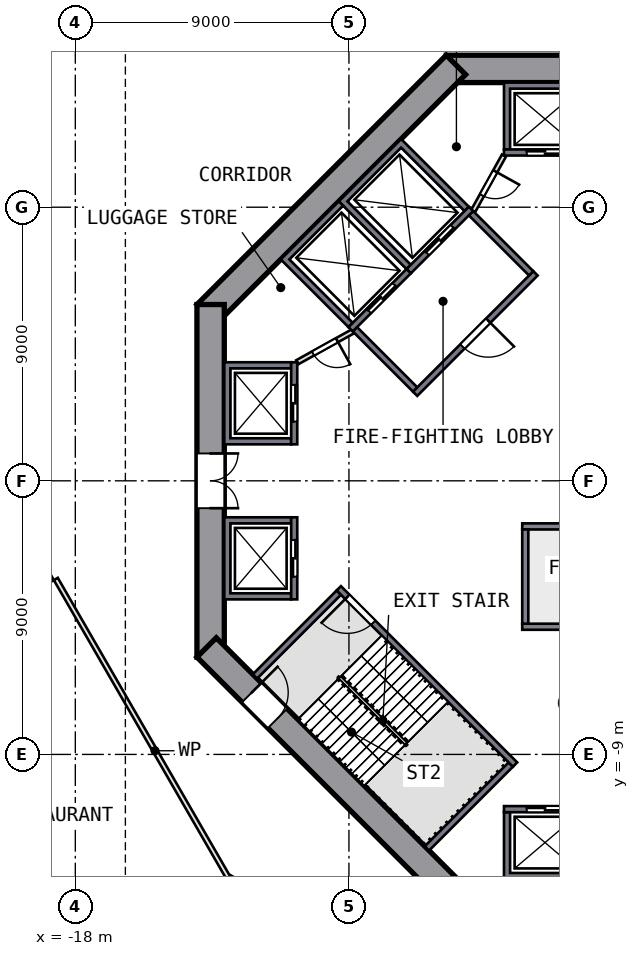
"""IFC4 building model, lengths in metres.
Left out: names, types, materials, properties, quantities, classifications, styles, units other than length and angle.
Written with IfcOpenShell. Run it as: python <this file> out.ifc"""

import sys

from ifc_helpers import new_model, si_unit, direction, frame, frame_2d, origin, place, context, subcontext, project, spatial, polyline, rectangle, outline, extrude, element, fill, save


model = new_model("IFC4")
c1 = context("Model", 3, precision=1e-05, world=origin(), true_north=direction((0.0, 1.0)))
c2 = subcontext(c1, "Body", "Model", "MODEL_VIEW")
j1 = project(units=[si_unit("LENGTHUNIT", "METRE"), si_unit("PLANEANGLEUNIT", "RADIAN")], contexts=[c1])
p1 = place(None, origin())
s1 = spatial("IfcSite", under=j1, at=p1, CompositionType="ELEMENT")
p2 = place(p1, origin())
s2 = spatial("IfcBuilding", under=s1, at=p2, CompositionType="ELEMENT")
p3 = place(p2, origin())
s3 = spatial("IfcBuildingStorey", under=s2, at=p3, CompositionType="ELEMENT", Elevation=0.0)
p4 = place(p3, frame((5.799, 13.55, 0.0), z_axis=(0.0, 0.0, 1.0), x_axis=(-1.0, 0.0, 0.0)))
e1 = element("IfcWall", 1, at=p4, inside=s3, PredefinedType="SHEAR", context=c2, shape_type="SweptSolid", body=[
    extrude(rectangle(XDim=11.598, YDim=0.9, at=frame_2d((5.799, 0.0))), origin(), (0.0, 0.0, 1.0), 8.0),
])
p5 = place(p4, frame((4.899, 0.0, 0.0)))
e2 = element("IfcOpeningElement", 2, at=p5, cuts=e1, PredefinedType="OPENING", context=c2, shape_type="SweptSolid", body=[
    extrude(rectangle(XDim=1.8, YDim=2.1, at=frame_2d((0.9, 1.05))), frame((0.0, 0.46, 0.0), z_axis=(0.0, -1.0, 0.0), x_axis=(1.0, 0.0, 0.0)), (0.0, 0.0, 1.0), 0.92),
])
p6 = place(p3, frame((-5.481, 13.682, 0.0), z_axis=(0.0, 0.0, 1.0), x_axis=(-0.707106781, -0.707106781, 0.0)))
e3 = element("IfcWall", 3, at=p6, inside=s3, PredefinedType="SHEAR", context=c2, shape_type="SweptSolid", body=[
    extrude(rectangle(XDim=11.598, YDim=0.9, at=frame_2d((5.799, 0.0))), origin(), (0.0, 0.0, 1.0), 8.0),
])
p7 = place(p3, frame((-13.55, 5.799, 0.0), z_axis=(0.0, 0.0, 1.0), x_axis=(0.0, -1.0, 0.0)))
e4 = element("IfcWall", 4, at=p7, inside=s3, PredefinedType="SHEAR", context=c2, shape_type="SweptSolid", body=[
    extrude(rectangle(XDim=11.598, YDim=0.9, at=frame_2d((5.799, 0.0))), origin(), (0.0, 0.0, 1.0), 8.0),
])
p8 = place(p7, frame((4.899, 0.0, 0.0)))
e5 = element("IfcOpeningElement", 5, at=p8, cuts=e4, PredefinedType="OPENING", context=c2, shape_type="SweptSolid", body=[
    extrude(rectangle(XDim=1.8, YDim=2.1, at=frame_2d((0.9, 1.05))), frame((0.0, 0.46, 0.0), z_axis=(0.0, -1.0, 0.0), x_axis=(1.0, 0.0, 0.0)), (0.0, 0.0, 1.0), 0.92),
])
p9 = place(p3, frame((-13.682, -5.481, 0.0), z_axis=(0.0, 0.0, 1.0), x_axis=(0.707106781, -0.707106781, 0.0)))
e6 = element("IfcWall", 6, at=p9, inside=s3, PredefinedType="SHEAR", context=c2, shape_type="SweptSolid", body=[
    extrude(rectangle(XDim=11.598, YDim=0.9, at=frame_2d((5.799, 0.0))), origin(), (0.0, 0.0, 1.0), 8.0),
])
p10 = place(p9, frame((2.099, 0.0, 0.0)))
e7 = element("IfcOpeningElement", 7, at=p10, cuts=e6, PredefinedType="OPENING", context=c2, shape_type="SweptSolid", body=[
    extrude(rectangle(XDim=1.2, YDim=2.1, at=frame_2d((0.6, 1.05))), frame((0.0, 0.46, 0.0), z_axis=(0.0, -1.0, 0.0), x_axis=(1.0, 0.0, 0.0)), (0.0, 0.0, 1.0), 0.92),
])
p11 = place(p3, origin())
e8 = element("IfcWall", 8, at=p11, inside=s3, PredefinedType="SOLIDWALL", context=c2, shape_type="SweptSolid", body=[
    extrude(outline(polyline([(-3.9, 10.9), (-3.9, 13.1), (-1.2, 13.1), (-1.2, 10.9), (-1.4, 10.9), (-1.4, 12.9), (-3.7, 12.9), (-3.7, 10.9), (-3.9, 10.9)])), origin(), (0.0, 0.0, 1.0), 7.55),
])
p12 = place(p3, frame((-1.2, 10.8, 0.0), z_axis=(0.0, 0.0, 1.0), x_axis=(-1.0, 0.0, 0.0)))
e9 = element("IfcWall", 9, at=p12, inside=s3, PredefinedType="SOLIDWALL", context=c2, shape_type="SweptSolid", body=[
    extrude(rectangle(XDim=2.7, YDim=0.2, at=frame_2d((1.35, 0.0))), origin(), (0.0, 0.0, 1.0), 7.55),
])
p13 = place(p12, frame((0.75, 0.0, 0.0)))
e10 = element("IfcOpeningElement", 10, at=p13, cuts=e9, PredefinedType="OPENING", context=c2, shape_type="SweptSolid", body=[
    extrude(rectangle(XDim=1.2, YDim=2.1, at=frame_2d((0.6, 1.05))), frame((0.0, 0.11, 0.0), z_axis=(0.0, -1.0, 0.0), x_axis=(1.0, 0.0, 0.0)), (0.0, 0.0, 1.0), 0.22),
])
p14 = place(p3, origin())
e11 = element("IfcWall", 11, at=p14, inside=s3, PredefinedType="SOLIDWALL", context=c2, shape_type="SweptSolid", body=[
    extrude(outline(polyline([(-13.1, 3.9), (-10.9, 3.9), (-10.9, 3.7), (-12.9, 3.7), (-12.9, 1.4), (-10.9, 1.4), (-10.9, 1.2), (-13.1, 1.2), (-13.1, 3.9)])), origin(), (0.0, 0.0, 1.0), 7.55),
])
p15 = place(p3, frame((-10.8, 1.2, 0.0), z_axis=(0.0, 0.0, 1.0), x_axis=(0.0, 1.0, 0.0)))
e12 = element("IfcWall", 12, at=p15, inside=s3, PredefinedType="SOLIDWALL", context=c2, shape_type="SweptSolid", body=[
    extrude(rectangle(XDim=2.7, YDim=0.2, at=frame_2d((1.35, 0.0))), origin(), (0.0, 0.0, 1.0), 7.55),
])
p16 = place(p15, frame((0.75, 0.0, 0.0)))
e13 = element("IfcOpeningElement", 13, at=p16, cuts=e12, PredefinedType="OPENING", context=c2, shape_type="SweptSolid", body=[
    extrude(rectangle(XDim=1.2, YDim=2.1, at=frame_2d((0.6, 1.05))), frame((0.0, 0.11, 0.0), z_axis=(0.0, -1.0, 0.0), x_axis=(1.0, 0.0, 0.0)), (0.0, 0.0, 1.0), 0.22),
])
p17 = place(p3, origin())
e14 = element("IfcWall", 14, at=p17, inside=s3, PredefinedType="SOLIDWALL", context=c2, shape_type="SweptSolid", body=[
    extrude(outline(polyline([(-13.1, -3.9), (-13.1, -1.2), (-10.9, -1.2), (-10.9, -1.4), (-12.9, -1.4), (-12.9, -3.7), (-10.9, -3.7), (-10.9, -3.9), (-13.1, -3.9)])), origin(), (0.0, 0.0, 1.0), 7.55),
])
p18 = place(p3, frame((-10.8, -1.2, 0.0), z_axis=(0.0, 0.0, 1.0), x_axis=(0.0, -1.0, 0.0)))
e15 = element("IfcWall", 15, at=p18, inside=s3, PredefinedType="SOLIDWALL", context=c2, shape_type="SweptSolid", body=[
    extrude(rectangle(XDim=2.7, YDim=0.2, at=frame_2d((1.35, 0.0))), origin(), (0.0, 0.0, 1.0), 7.55),
])
p19 = place(p18, frame((0.75, 0.0, 0.0)))
e16 = element("IfcOpeningElement", 16, at=p19, cuts=e15, PredefinedType="OPENING", context=c2, shape_type="SweptSolid", body=[
    extrude(rectangle(XDim=1.2, YDim=2.1, at=frame_2d((0.6, 1.05))), frame((0.0, 0.11, 0.0), z_axis=(0.0, -1.0, 0.0), x_axis=(1.0, 0.0, 0.0)), (0.0, 0.0, 1.0), 0.22),
])
p20 = place(p3, origin())
e17 = element("IfcWall", 17, at=p20, inside=s3, PredefinedType="SOLIDWALL", context=c2, shape_type="SweptSolid", body=[
    extrude(outline(polyline([(-3.9, -13.1), (-3.9, -10.9), (-3.7, -10.9), (-3.7, -12.9), (-1.4, -12.9), (-1.4, -10.9), (-1.2, -10.9), (-1.2, -13.1), (-3.9, -13.1)])), origin(), (0.0, 0.0, 1.0), 7.55),
])
p21 = place(p3, frame((-1.2, -10.8, 0.0), z_axis=(0.0, 0.0, 1.0), x_axis=(-1.0, 0.0, 0.0)))
e18 = element("IfcWall", 18, at=p21, inside=s3, PredefinedType="SOLIDWALL", context=c2, shape_type="SweptSolid", body=[
    extrude(rectangle(XDim=2.7, YDim=0.2, at=frame_2d((1.35, 0.0))), origin(), (0.0, 0.0, 1.0), 7.55),
])
p22 = place(p21, frame((0.75, 0.0, 0.0)))
e19 = element("IfcOpeningElement", 19, at=p22, cuts=e18, PredefinedType="OPENING", context=c2, shape_type="SweptSolid", body=[
    extrude(rectangle(XDim=1.2, YDim=2.1, at=frame_2d((0.6, 1.05))), frame((0.0, 0.11, 0.0), z_axis=(0.0, -1.0, 0.0), x_axis=(1.0, 0.0, 0.0)), (0.0, 0.0, 1.0), 0.22),
])
p23 = place(p3, origin())
e20 = element("IfcWall", 20, at=p23, inside=s3, PredefinedType="SOLIDWALL", context=c2, shape_type="SweptSolid", body=[
    extrude(outline(polyline([(-9.334, 9.192), (-7.283, 11.243), (-5.056, 9.016), (-5.197, 8.874), (-7.283, 10.96), (-9.051, 9.192), (-6.965, 7.106), (-7.106, 6.965), (-9.334, 9.192)])), origin(), (0.0, 0.0, 1.0), 7.55),
])
p24 = place(p3, frame((-4.985, 8.945, 0.0), z_axis=(0.0, 0.0, 1.0), x_axis=(-0.707106781, -0.707106781, 0.0)))
e21 = element("IfcWall", 21, at=p24, inside=s3, PredefinedType="SOLIDWALL", context=c2, shape_type="SweptSolid", body=[
    extrude(rectangle(XDim=2.9, YDim=0.2, at=frame_2d((1.45, 0.0))), origin(), (0.0, 0.0, 1.0), 7.55),
])
p25 = place(p24, frame((0.85, 0.0, 0.0)))
e22 = element("IfcOpeningElement", 22, at=p25, cuts=e21, PredefinedType="OPENING", context=c2, shape_type="SweptSolid", body=[
    extrude(rectangle(XDim=1.2, YDim=2.1, at=frame_2d((0.6, 1.05))), frame((0.0, 0.11, 0.0), z_axis=(0.0, -1.0, 0.0), x_axis=(1.0, 0.0, 0.0)), (0.0, 0.0, 1.0), 0.22),
])
p26 = place(p3, origin())
e23 = element("IfcWall", 23, at=p26, inside=s3, PredefinedType="SOLIDWALL", context=c2, shape_type="SweptSolid", body=[
    extrude(outline(polyline([(-11.243, 7.283), (-9.334, 9.192), (-9.192, 9.051), (-10.96, 7.283), (-8.874, 5.197), (-9.016, 5.056), (-11.243, 7.283)])), origin(), (0.0, 0.0, 1.0), 7.55),
])
p27 = place(p3, frame((-7.036, 6.894, 0.0), z_axis=(0.0, 0.0, 1.0), x_axis=(-0.707106781, -0.707106781, 0.0)))
e24 = element("IfcWall", 24, at=p27, inside=s3, PredefinedType="SOLIDWALL", context=c2, shape_type="SweptSolid", body=[
    extrude(rectangle(XDim=2.7, YDim=0.2, at=frame_2d((1.35, 0.0))), origin(), (0.0, 0.0, 1.0), 7.55),
])
p28 = place(p27, frame((0.65, 0.0, 0.0)))
e25 = element("IfcOpeningElement", 25, at=p28, cuts=e24, PredefinedType="OPENING", context=c2, shape_type="SweptSolid", body=[
    extrude(rectangle(XDim=1.2, YDim=2.1, at=frame_2d((0.6, 1.05))), frame((0.0, 0.11, 0.0), z_axis=(0.0, -1.0, 0.0), x_axis=(1.0, 0.0, 0.0)), (0.0, 0.0, 1.0), 0.22),
])
p29 = place(p3, frame((-3.535, -9.334, 0.0), z_axis=(0.0, 0.0, 1.0), x_axis=(-0.707106781, 0.707106781, 0.0)))
e26 = element("IfcWall", 26, at=p29, inside=s3, PredefinedType="SOLIDWALL", context=c2, shape_type="SweptSolid", body=[
    extrude(rectangle(XDim=8.2, YDim=0.2, at=frame_2d((4.1, 0.0))), origin(), (0.0, 0.0, 1.0), 7.55),
])
p30 = place(p29, frame((6.6, 0.0, 0.0)))
e27 = element("IfcOpeningElement", 27, at=p30, cuts=e26, PredefinedType="OPENING", context=c2, shape_type="SweptSolid", body=[
    extrude(rectangle(XDim=1.2, YDim=2.1, at=frame_2d((0.6, 1.05))), frame((0.0, 0.11, 0.0), z_axis=(0.0, -1.0, 0.0), x_axis=(1.0, 0.0, 0.0)), (0.0, 0.0, 1.0), 0.22),
])
for number, where, z_axis, x_axis in (
    (28, (-9.334, -3.677, 0.0), (0.0, 0.0, 1.0), (-0.707, -0.707, 0.0)),
    (29, (-3.677, -9.334, 0.0), (0.0, 0.0, 1.0), (-0.707, -0.707, 0.0)),
):
    element("IfcWall", number, at=place(p3, frame(where, z_axis=z_axis, x_axis=x_axis)), inside=s3, PredefinedType="SOLIDWALL", context=c2, shape_type="SweptSolid", body=[
        extrude(rectangle(XDim=3.9, YDim=0.2, at=frame_2d((1.95, 0.0))), origin(), (0.0, 0.0, 1.0), 7.55),
    ])
p31 = place(p3, frame((-2.864, 6.823, 0.0), z_axis=(0.0, 0.0, 1.0), x_axis=(-0.707106781, -0.707106781, 0.0)))
e30 = element("IfcWall", 30, at=p31, inside=s3, PredefinedType="SOLIDWALL", context=c2, shape_type="SweptSolid", body=[
    extrude(rectangle(XDim=5.6, YDim=0.2, at=frame_2d((2.8, 0.0))), origin(), (0.0, 0.0, 1.0), 7.55),
])
p32 = place(p31, frame((2.2, 0.0, 0.0)))
e31 = element("IfcOpeningElement", 31, at=p32, cuts=e30, PredefinedType="OPENING", context=c2, shape_type="SweptSolid", body=[
    extrude(rectangle(XDim=1.2, YDim=2.1, at=frame_2d((0.6, 1.05))), frame((0.0, 0.11, 0.0), z_axis=(0.0, -1.0, 0.0), x_axis=(1.0, 0.0, 0.0)), (0.0, 0.0, 1.0), 0.22),
])
for number, where, z_axis, x_axis in (
    (32, (-3.005, 6.823, 0.0), (0.0, 0.0, 1.0), (-0.707, 0.707, 0.0)),
    (33, (-6.823, 3.005, 0.0), (0.0, 0.0, 1.0), (-0.707, 0.707, 0.0)),
):
    element("IfcWall", number, at=place(p3, frame(where, z_axis=z_axis, x_axis=x_axis)), inside=s3, PredefinedType="SOLIDWALL", context=c2, shape_type="SweptSolid", body=[
        extrude(rectangle(XDim=2.8, YDim=0.2, at=frame_2d((1.4, 0.0))), origin(), (0.0, 0.0, 1.0), 7.55),
    ])
p33 = place(p3, frame((-3.9, 10.7, 0.0), z_axis=(0.0, 0.0, 1.0), x_axis=(-0.485692555, -0.874129705, 0.0)))
e34 = element("IfcWall", 34, at=p33, inside=s3, PredefinedType="PARTITIONING", context=c2, shape_type="SweptSolid", body=[
    extrude(rectangle(XDim=2.089, YDim=0.15, at=frame_2d((1.044, 0.0))), origin(), (0.0, 0.0, 1.0), 7.55),
])
p34 = place(p33, frame((0.594, 0.0, 0.0)))
e35 = element("IfcOpeningElement", 35, at=p34, cuts=e34, PredefinedType="OPENING", context=c2, shape_type="SweptSolid", body=[
    extrude(rectangle(XDim=0.9, YDim=2.1, at=frame_2d((0.45, 1.05))), frame((0.0, 0.085, 0.0), z_axis=(0.0, -1.0, 0.0), x_axis=(1.0, 0.0, 0.0)), (0.0, 0.0, 1.0), 0.17),
])
p35 = place(p3, frame((-8.874, 4.914, 0.0), z_axis=(0.0, 0.0, 1.0), x_axis=(-0.874129705, -0.485692555, 0.0)))
e36 = element("IfcWall", 36, at=p35, inside=s3, PredefinedType="PARTITIONING", context=c2, shape_type="SweptSolid", body=[
    extrude(rectangle(XDim=2.089, YDim=0.15, at=frame_2d((1.044, 0.0))), origin(), (0.0, 0.0, 1.0), 7.55),
])
p36 = place(p35, frame((0.594, 0.0, 0.0)))
e37 = element("IfcOpeningElement", 37, at=p36, cuts=e36, PredefinedType="OPENING", context=c2, shape_type="SweptSolid", body=[
    extrude(rectangle(XDim=0.9, YDim=2.1, at=frame_2d((0.45, 1.05))), frame((0.0, 0.085, 0.0), z_axis=(0.0, -1.0, 0.0), x_axis=(1.0, 0.0, 0.0)), (0.0, 0.0, 1.0), 0.17),
])
p37 = place(p3, frame((-3.3, -4.8, 0.0), z_axis=(0.0, 0.0, 1.0), x_axis=(1.0, 0.0, 0.0)))
e38 = element("IfcWall", 38, at=p37, inside=s3, PredefinedType="SOLIDWALL", context=c2, shape_type="SweptSolid", body=[
    extrude(rectangle(XDim=6.6, YDim=0.2, at=frame_2d((3.3, 0.0))), origin(), (0.0, 0.0, 1.0), 3.4),
])
p38 = place(p3, frame((-3.2, -4.7, 0.0), z_axis=(0.0, 0.0, 1.0), x_axis=(0.0, 1.0, 0.0)))
e39 = element("IfcWall", 39, at=p38, inside=s3, PredefinedType="SOLIDWALL", context=c2, shape_type="SweptSolid", body=[
    extrude(rectangle(XDim=3.1, YDim=0.2, at=frame_2d((1.55, 0.0))), origin(), (0.0, 0.0, 1.0), 3.4),
])
p39 = place(p3, frame((-3.3, -1.5, 0.0), z_axis=(0.0, 0.0, 1.0), x_axis=(1.0, 0.0, 0.0)))
e40 = element("IfcWall", 40, at=p39, inside=s3, PredefinedType="SOLIDWALL", context=c2, shape_type="SweptSolid", body=[
    extrude(rectangle(XDim=6.6, YDim=0.2, at=frame_2d((3.3, 0.0))), origin(), (0.0, 0.0, 1.0), 3.4),
])
p40 = place(p39, frame((2.7, 0.0, 0.0)))
e41 = element("IfcOpeningElement", 41, at=p40, cuts=e40, PredefinedType="OPENING", context=c2, shape_type="SweptSolid", body=[
    extrude(rectangle(XDim=1.2, YDim=2.1, at=frame_2d((0.6, 1.05))), frame((0.0, 0.11, 0.0), z_axis=(0.0, -1.0, 0.0), x_axis=(1.0, 0.0, 0.0)), (0.0, 0.0, 1.0), 0.22),
])
p41 = place(p3, frame((-18.744, -3.201, 0.0), z_axis=(0.0, 0.0, 1.0), x_axis=(-0.866027538, -0.499996304, 0.0)))
e42 = element("IfcWall", 42, at=p41, inside=s3, PredefinedType="PARTITIONING", context=c2, shape_type="SweptSolid", body=[
    extrude(rectangle(XDim=5.582, YDim=0.15, at=frame_2d((2.791, 0.0))), origin(), (0.0, 0.0, 1.0), 7.55),
])
p42 = place(p3, frame((-12.117, -14.53, 0.0), z_axis=(0.0, 0.0, 1.0), x_axis=(-0.500006399, 0.866021709, 0.0)))
e43 = element("IfcWall", 43, at=p42, inside=s3, PredefinedType="PARTITIONING", context=c2, shape_type="SweptSolid", body=[
    extrude(rectangle(XDim=13.05, YDim=0.15, at=frame_2d((6.525, 0.0))), origin(), (0.0, 0.0, 1.0), 7.55),
])
p43 = place(p3, frame((-4.823, -17.721, 0.0), z_axis=(0.0, 0.0, 1.0), x_axis=(-0.866037142, 0.499979668, 0.0)))
e44 = element("IfcWall", 44, at=p43, inside=s3, PredefinedType="PARTITIONING", context=c2, shape_type="SweptSolid", body=[
    extrude(rectangle(XDim=9.367, YDim=0.15, at=frame_2d((4.683, 0.0))), origin(), (0.0, 0.0, 1.0), 7.55),
])
p44 = place(p13, origin())
e45 = element("IfcDoor", 45, at=p44, inside=s3, OperationType="DOUBLE_DOOR_SLIDING", PredefinedType="DOOR", context=c2, shape_type="SweptSolid", body=[
    extrude(rectangle(XDim=1.2, YDim=2.1, at=frame_2d((0.6, 1.05))), frame((0.0, 0.025, 0.0), z_axis=(0.0, -1.0, 0.0), x_axis=(1.0, 0.0, 0.0)), (0.0, 0.0, 1.0), 0.05),
])
fill(e10, e45)
p45 = place(p16, origin())
e46 = element("IfcDoor", 46, at=p45, inside=s3, OperationType="DOUBLE_DOOR_SLIDING", PredefinedType="DOOR", context=c2, shape_type="SweptSolid", body=[
    extrude(rectangle(XDim=1.2, YDim=2.1, at=frame_2d((0.6, 1.05))), frame((0.0, 0.025, 0.0), z_axis=(0.0, -1.0, 0.0), x_axis=(1.0, 0.0, 0.0)), (0.0, 0.0, 1.0), 0.05),
])
fill(e13, e46)
p46 = place(p19, origin())
e47 = element("IfcDoor", 47, at=p46, inside=s3, OperationType="DOUBLE_DOOR_SLIDING", PredefinedType="DOOR", context=c2, shape_type="SweptSolid", body=[
    extrude(rectangle(XDim=1.2, YDim=2.1, at=frame_2d((0.6, 1.05))), frame((0.0, 0.025, 0.0), z_axis=(0.0, -1.0, 0.0), x_axis=(1.0, 0.0, 0.0)), (0.0, 0.0, 1.0), 0.05),
])
fill(e16, e47)
p47 = place(p22, origin())
e48 = element("IfcDoor", 48, at=p47, inside=s3, OperationType="DOUBLE_DOOR_SLIDING", PredefinedType="DOOR", context=c2, shape_type="SweptSolid", body=[
    extrude(rectangle(XDim=1.2, YDim=2.1, at=frame_2d((0.6, 1.05))), frame((0.0, 0.025, 0.0), z_axis=(0.0, -1.0, 0.0), x_axis=(1.0, 0.0, 0.0)), (0.0, 0.0, 1.0), 0.05),
])
fill(e19, e48)
p48 = place(p25, origin())
e49 = element("IfcDoor", 49, at=p48, inside=s3, OperationType="DOUBLE_DOOR_SLIDING", PredefinedType="DOOR", context=c2, shape_type="SweptSolid", body=[
    extrude(rectangle(XDim=1.2, YDim=2.1, at=frame_2d((0.6, 1.05))), frame((0.0, 0.025, 0.0), z_axis=(0.0, -1.0, 0.0), x_axis=(1.0, 0.0, 0.0)), (0.0, 0.0, 1.0), 0.05),
])
fill(e22, e49)
p49 = place(p28, origin())
e50 = element("IfcDoor", 50, at=p49, inside=s3, OperationType="DOUBLE_DOOR_SLIDING", PredefinedType="DOOR", context=c2, shape_type="SweptSolid", body=[
    extrude(rectangle(XDim=1.2, YDim=2.1, at=frame_2d((0.6, 1.05))), frame((0.0, 0.025, 0.0), z_axis=(0.0, -1.0, 0.0), x_axis=(1.0, 0.0, 0.0)), (0.0, 0.0, 1.0), 0.05),
])
fill(e25, e50)
p50 = place(p30, origin())
e51 = element("IfcDoor", 51, at=p50, inside=s3, OperationType="SINGLE_SWING_RIGHT", PredefinedType="DOOR", context=c2, shape_type="SweptSolid", body=[
    extrude(rectangle(XDim=1.2, YDim=2.1, at=frame_2d((0.6, 1.05))), frame((0.0, 0.025, 0.0), z_axis=(0.0, -1.0, 0.0), x_axis=(1.0, 0.0, 0.0)), (0.0, 0.0, 1.0), 0.05),
])
fill(e27, e51)
p51 = place(p8, origin())
e52 = element("IfcDoor", 52, at=p51, inside=s3, OperationType="DOUBLE_DOOR_SINGLE_SWING", PredefinedType="DOOR", context=c2, shape_type="SweptSolid", body=[
    extrude(rectangle(XDim=1.8, YDim=2.1, at=frame_2d((0.9, 1.05))), frame((0.0, 0.025, 0.0), z_axis=(0.0, -1.0, 0.0), x_axis=(1.0, 0.0, 0.0)), (0.0, 0.0, 1.0), 0.05),
])
fill(e5, e52)
p52 = place(p10, origin())
e53 = element("IfcDoor", 53, at=p52, inside=s3, OperationType="SINGLE_SWING_LEFT", PredefinedType="DOOR", context=c2, shape_type="SweptSolid", body=[
    extrude(rectangle(XDim=1.2, YDim=2.1, at=frame_2d((0.6, 1.05))), frame((0.0, 0.025, 0.0), z_axis=(0.0, -1.0, 0.0), x_axis=(1.0, 0.0, 0.0)), (0.0, 0.0, 1.0), 0.05),
])
fill(e7, e53)
p53 = place(p32, origin())
e54 = element("IfcDoor", 54, at=p53, inside=s3, OperationType="SINGLE_SWING_LEFT", PredefinedType="DOOR", context=c2, shape_type="SweptSolid", body=[
    extrude(rectangle(XDim=1.2, YDim=2.1, at=frame_2d((0.6, 1.05))), frame((0.0, 0.025, 0.0), z_axis=(0.0, -1.0, 0.0), x_axis=(1.0, 0.0, 0.0)), (0.0, 0.0, 1.0), 0.05),
])
fill(e31, e54)
p54 = place(p34, origin())
e55 = element("IfcDoor", 55, at=p54, inside=s3, OperationType="SINGLE_SWING_LEFT", PredefinedType="DOOR", context=c2, shape_type="SweptSolid", body=[
    extrude(rectangle(XDim=0.9, YDim=2.1, at=frame_2d((0.45, 1.05))), frame((0.0, 0.025, 0.0), z_axis=(0.0, -1.0, 0.0), x_axis=(1.0, 0.0, 0.0)), (0.0, 0.0, 1.0), 0.05),
])
fill(e35, e55)
p55 = place(p36, origin())
e56 = element("IfcDoor", 56, at=p55, inside=s3, OperationType="SINGLE_SWING_LEFT", PredefinedType="DOOR", context=c2, shape_type="SweptSolid", body=[
    extrude(rectangle(XDim=0.9, YDim=2.1, at=frame_2d((0.45, 1.05))), frame((0.0, 0.025, 0.0), z_axis=(0.0, -1.0, 0.0), x_axis=(1.0, 0.0, 0.0)), (0.0, 0.0, 1.0), 0.05),
])
fill(e37, e56)
save(model, sys.argv[1])
